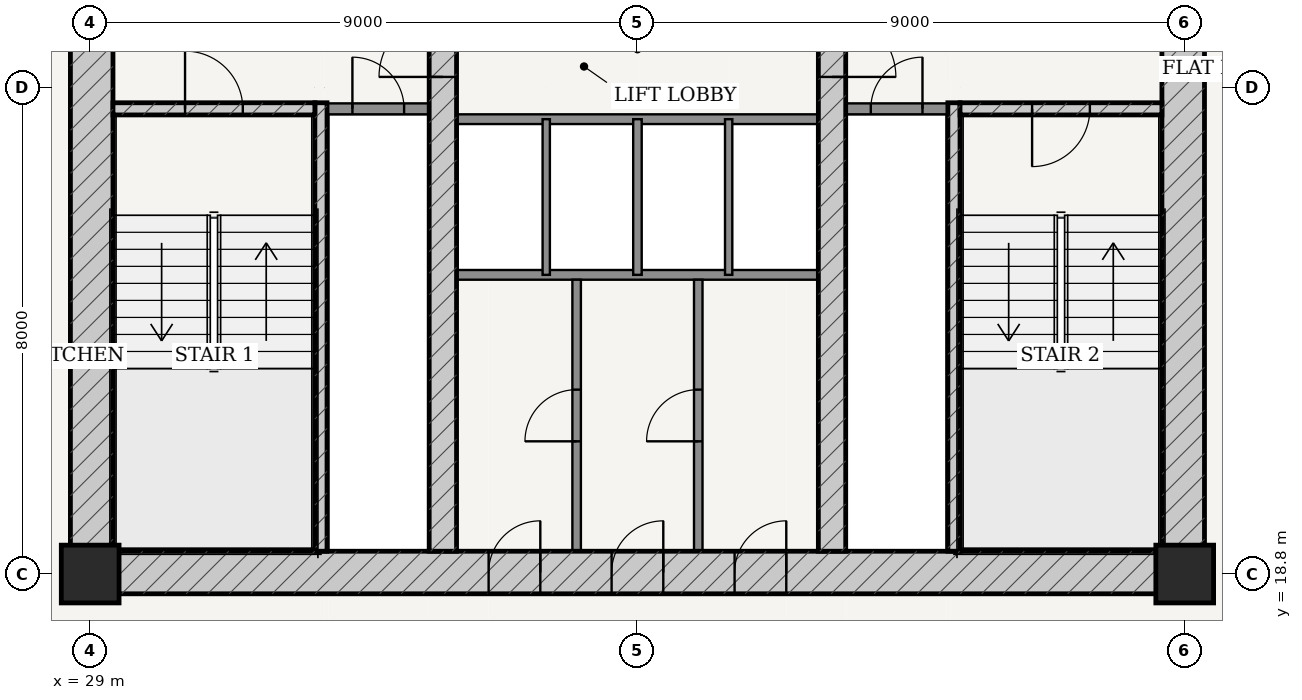
"""IFC4 building model, lengths in metres.
Left out: names, types, materials, properties, quantities, classifications, styles, units other than length and angle.
Written with IfcOpenShell. Run it as: python <this file> out.ifc"""

import sys

from ifc_helpers import new_model, si_unit, direction, frame, frame_2d, origin, origin_2d, place, context, subcontext, project, spatial, rectangle, extrude, source, transform, mapped, element, fill, save


model = new_model("IFC4")
c1 = context("Model", 3, precision=1e-05, world=origin(), true_north=direction((-0.2419218956, 0.970295726276)))
c2 = subcontext(c1, "Body", "Model", "MODEL_VIEW")
j1 = project(units=[si_unit("LENGTHUNIT", "METRE"), si_unit("PLANEANGLEUNIT", "RADIAN")], contexts=[c1])
p1 = place(None, origin())
s1 = spatial("IfcSite", under=j1, at=p1, CompositionType="ELEMENT")
p2 = place(p1, origin())
s2 = spatial("IfcBuilding", under=s1, at=p2, CompositionType="ELEMENT")
p3 = place(p2, frame((0.0, 0.0, 101.4)))
s3 = spatial("IfcBuildingStorey", under=s2, at=p3, CompositionType="ELEMENT", Elevation=101.4)
for number, where, z_axis, x_axis in (
    (1, (29.0, 18.8, 0.0), (0.0, 0.0, 1.0), (1.0, 0.0, 0.0)),
    (2, (47.0, 18.8, 0.0), (0.0, 0.0, 1.0), (1.0, 0.0, 0.0)),
):
    element("IfcColumn", number, at=place(p3, frame(where, z_axis=z_axis, x_axis=x_axis)), inside=s3, PredefinedType="COLUMN", context=c2, shape_type="SweptSolid", body=[
        extrude(rectangle(XDim=0.95, YDim=0.95, at=origin_2d()), origin(), (0.0, 0.0, 1.0), 3.6),
    ])
p4 = place(p3, frame((28.675, 18.825, 0.0), z_axis=(0.0, 0.0, 1.0), x_axis=(1.0, 0.0, 0.0)))
e3 = element("IfcWall", 3, at=p4, inside=s3, PredefinedType="SHEAR", context=c2, shape_type="SweptSolid", body=[
    extrude(rectangle(XDim=18.65, YDim=0.7, at=frame_2d((9.325, 0.0))), origin(), (0.0, 0.0, 1.0), 3.325),
])
p5 = place(p4, frame((6.877, 0.0, 0.0)))
e4 = element("IfcOpeningElement", 4, at=p5, cuts=e3, PredefinedType="OPENING", context=c2, shape_type="SweptSolid", body=[
    extrude(rectangle(XDim=0.85, YDim=2.1, at=frame_2d((0.425, 1.05))), frame((0.0, 0.36, 0.0), z_axis=(0.0, -1.0, 0.0), x_axis=(1.0, 0.0, 0.0)), (0.0, 0.0, 1.0), 0.72),
])
p6 = place(p4, frame((8.9, 0.0, 0.0)))
e5 = element("IfcOpeningElement", 5, at=p6, cuts=e3, PredefinedType="OPENING", context=c2, shape_type="SweptSolid", body=[
    extrude(rectangle(XDim=0.85, YDim=2.1, at=frame_2d((0.425, 1.05))), frame((0.0, 0.36, 0.0), z_axis=(0.0, -1.0, 0.0), x_axis=(1.0, 0.0, 0.0)), (0.0, 0.0, 1.0), 0.72),
])
p7 = place(p4, frame((10.923, 0.0, 0.0)))
e6 = element("IfcOpeningElement", 6, at=p7, cuts=e3, PredefinedType="OPENING", context=c2, shape_type="SweptSolid", body=[
    extrude(rectangle(XDim=0.85, YDim=2.1, at=frame_2d((0.425, 1.05))), frame((0.0, 0.36, 0.0), z_axis=(0.0, -1.0, 0.0), x_axis=(1.0, 0.0, 0.0)), (0.0, 0.0, 1.0), 0.72),
])
p8 = place(p3, frame((29.025, 19.175, 0.0), z_axis=(0.0, 0.0, 1.0), x_axis=(0.0, 1.0, 0.0)))
e7 = element("IfcWall", 7, at=p8, inside=s3, PredefinedType="SHEAR", context=c2, shape_type="SweptSolid", body=[
    extrude(rectangle(XDim=15.25, YDim=0.7, at=frame_2d((7.625, 0.0))), origin(), (0.0, 0.0, 1.0), 3.325),
])
p9 = place(p8, frame((9.875, 0.0, 0.0)))
e8 = element("IfcOpeningElement", 8, at=p9, cuts=e7, PredefinedType="OPENING", context=c2, shape_type="SweptSolid", body=[
    extrude(rectangle(XDim=1.5, YDim=2.2, at=frame_2d((0.75, 1.1))), frame((0.0, 0.36, 0.0), z_axis=(0.0, -1.0, 0.0), x_axis=(1.0, 0.0, 0.0)), (0.0, 0.0, 1.0), 0.72),
])
p10 = place(p3, frame((46.975, 19.175, 0.0), z_axis=(0.0, 0.0, 1.0), x_axis=(0.0, 1.0, 0.0)))
e9 = element("IfcWall", 9, at=p10, inside=s3, PredefinedType="SHEAR", context=c2, shape_type="SweptSolid", body=[
    extrude(rectangle(XDim=15.25, YDim=0.7, at=frame_2d((7.625, 0.0))), origin(), (0.0, 0.0, 1.0), 3.325),
])
p11 = place(p10, frame((9.875, 0.0, 0.0)))
e10 = element("IfcOpeningElement", 10, at=p11, cuts=e9, PredefinedType="OPENING", context=c2, shape_type="SweptSolid", body=[
    extrude(rectangle(XDim=1.5, YDim=2.2, at=frame_2d((0.75, 1.1))), frame((0.0, 0.36, 0.0), z_axis=(0.0, -1.0, 0.0), x_axis=(1.0, 0.0, 0.0)), (0.0, 0.0, 1.0), 0.72),
])
p12 = place(p3, frame((32.795, 19.175, 0.0), z_axis=(0.0, 0.0, 1.0), x_axis=(0.0, 1.0, 0.0)))
e11 = element("IfcWall", 11, at=p12, inside=s3, PredefinedType="SOLIDWALL", context=c2, shape_type="SweptSolid", body=[
    extrude(rectangle(XDim=7.375, YDim=0.2, at=frame_2d((3.688, 0.0))), origin(), (0.0, 0.0, 1.0), 3.325),
])
p13 = place(p3, frame((29.375, 26.45, 0.0), z_axis=(0.0, 0.0, 1.0), x_axis=(1.0, 0.0, 0.0)))
e12 = element("IfcWall", 12, at=p13, inside=s3, PredefinedType="SOLIDWALL", context=c2, shape_type="SweptSolid", body=[
    extrude(rectangle(XDim=3.32, YDim=0.2, at=frame_2d((1.66, 0.0))), origin(), (0.0, 0.0, 1.0), 3.325),
])
p14 = place(p13, frame((1.185, 0.0, 0.0)))
e13 = element("IfcOpeningElement", 13, at=p14, cuts=e12, PredefinedType="OPENING", context=c2, shape_type="SweptSolid", body=[
    extrude(rectangle(XDim=0.95, YDim=2.15, at=frame_2d((0.475, 1.075))), frame((0.0, 0.11, 0.0), z_axis=(0.0, -1.0, 0.0), x_axis=(1.0, 0.0, 0.0)), (0.0, 0.0, 1.0), 0.22),
])
p15 = place(p3, frame((43.205, 19.175, 0.0), z_axis=(0.0, 0.0, 1.0), x_axis=(0.0, 1.0, 0.0)))
e14 = element("IfcWall", 14, at=p15, inside=s3, PredefinedType="SOLIDWALL", context=c2, shape_type="SweptSolid", body=[
    extrude(rectangle(XDim=7.375, YDim=0.2, at=frame_2d((3.688, 0.0))), origin(), (0.0, 0.0, 1.0), 3.325),
])
p16 = place(p3, frame((43.305, 26.45, 0.0), z_axis=(0.0, 0.0, 1.0), x_axis=(1.0, 0.0, 0.0)))
e15 = element("IfcWall", 15, at=p16, inside=s3, PredefinedType="SOLIDWALL", context=c2, shape_type="SweptSolid", body=[
    extrude(rectangle(XDim=3.32, YDim=0.2, at=frame_2d((1.66, 0.0))), origin(), (0.0, 0.0, 1.0), 3.325),
])
p17 = place(p16, frame((1.185, 0.0, 0.0)))
e16 = element("IfcOpeningElement", 16, at=p17, cuts=e15, PredefinedType="OPENING", context=c2, shape_type="SweptSolid", body=[
    extrude(rectangle(XDim=0.95, YDim=2.15, at=frame_2d((0.475, 1.075))), frame((0.0, 0.11, 0.0), z_axis=(0.0, -1.0, 0.0), x_axis=(1.0, 0.0, 0.0)), (0.0, 0.0, 1.0), 0.22),
])
p18 = place(p3, frame((34.8, 19.175, 0.0), z_axis=(0.0, 0.0, 1.0), x_axis=(0.0, 1.0, 0.0)))
e17 = element("IfcWall", 17, at=p18, inside=s3, PredefinedType="SHEAR", context=c2, shape_type="SweptSolid", body=[
    extrude(rectangle(XDim=15.25, YDim=0.45, at=frame_2d((7.625, 0.0))), origin(), (0.0, 0.0, 1.0), 3.325),
])
p19 = place(p18, frame((7.8, 0.0, 0.0)))
e18 = element("IfcOpeningElement", 18, at=p19, cuts=e17, PredefinedType="OPENING", context=c2, shape_type="SweptSolid", body=[
    extrude(rectangle(XDim=1.05, YDim=2.15, at=frame_2d((0.525, 1.075))), frame((0.0, 0.235, 0.0), z_axis=(0.0, -1.0, 0.0), x_axis=(1.0, 0.0, 0.0)), (0.0, 0.0, 1.0), 0.47),
])
p20 = place(p3, frame((41.2, 19.175, 0.0), z_axis=(0.0, 0.0, 1.0), x_axis=(0.0, 1.0, 0.0)))
e19 = element("IfcWall", 19, at=p20, inside=s3, PredefinedType="SHEAR", context=c2, shape_type="SweptSolid", body=[
    extrude(rectangle(XDim=15.25, YDim=0.45, at=frame_2d((7.625, 0.0))), origin(), (0.0, 0.0, 1.0), 3.325),
])
p21 = place(p20, frame((7.8, 0.0, 0.0)))
e20 = element("IfcOpeningElement", 20, at=p21, cuts=e19, PredefinedType="OPENING", context=c2, shape_type="SweptSolid", body=[
    extrude(rectangle(XDim=1.05, YDim=2.15, at=frame_2d((0.525, 1.075))), frame((0.0, 0.235, 0.0), z_axis=(0.0, -1.0, 0.0), x_axis=(1.0, 0.0, 0.0)), (0.0, 0.0, 1.0), 0.47),
])
p22 = place(p3, frame((32.9, 26.45, 0.0), z_axis=(0.0, 0.0, 1.0), x_axis=(1.0, 0.0, 0.0)))
e21 = element("IfcWall", 21, at=p22, inside=s3, PredefinedType="PARTITIONING", context=c2, shape_type="SweptSolid", body=[
    extrude(rectangle(XDim=1.675, YDim=0.18, at=frame_2d((0.837, 0.0))), origin(), (0.0, 0.0, 1.0), 3.325),
])
p23 = place(p22, frame((0.413, 0.0, 0.0)))
e22 = element("IfcOpeningElement", 22, at=p23, cuts=e21, PredefinedType="OPENING", context=c2, shape_type="SweptSolid", body=[
    extrude(rectangle(XDim=0.85, YDim=2.1, at=frame_2d((0.425, 1.05))), frame((0.0, 0.1, 0.0), z_axis=(0.0, -1.0, 0.0), x_axis=(1.0, 0.0, 0.0)), (0.0, 0.0, 1.0), 0.2),
])
p24 = place(p3, frame((41.425, 26.45, 0.0), z_axis=(0.0, 0.0, 1.0), x_axis=(1.0, 0.0, 0.0)))
e23 = element("IfcWall", 23, at=p24, inside=s3, PredefinedType="PARTITIONING", context=c2, shape_type="SweptSolid", body=[
    extrude(rectangle(XDim=1.675, YDim=0.18, at=frame_2d((0.837, 0.0))), origin(), (0.0, 0.0, 1.0), 3.325),
])
p25 = place(p24, frame((0.413, 0.0, 0.0)))
e24 = element("IfcOpeningElement", 24, at=p25, cuts=e23, PredefinedType="OPENING", context=c2, shape_type="SweptSolid", body=[
    extrude(rectangle(XDim=0.85, YDim=2.1, at=frame_2d((0.425, 1.05))), frame((0.0, 0.1, 0.0), z_axis=(0.0, -1.0, 0.0), x_axis=(1.0, 0.0, 0.0)), (0.0, 0.0, 1.0), 0.2),
])
for number, where, z_axis, x_axis in (
    (25, (35.025, 26.28, 0.0), (0.0, 0.0, 1.0), (1.0, 0.0, 0.0)),
    (26, (35.025, 23.72, 0.0), (0.0, 0.0, 1.0), (1.0, 0.0, 0.0)),
):
    element("IfcWall", number, at=place(p3, frame(where, z_axis=z_axis, x_axis=x_axis)), inside=s3, PredefinedType="PARTITIONING", context=c2, shape_type="SweptSolid", body=[
        extrude(rectangle(XDim=5.95, YDim=0.16, at=frame_2d((2.975, 0.0))), origin(), (0.0, 0.0, 1.0), 3.325),
    ])
p26 = place(p3, frame((36.5, 23.72, 0.0), z_axis=(0.0, 0.0, 1.0), x_axis=(0.0, 1.0, 0.0)))
e27 = element("IfcWall", 27, at=p26, inside=s3, PredefinedType="PARTITIONING", context=c2, shape_type="SweptSolid", body=[
    extrude(rectangle(XDim=2.56, YDim=0.12, at=frame_2d((1.28, 0.0))), origin(), (0.0, 0.0, 1.0), 3.325),
])
p27 = place(p3, frame((38.0, 23.72, 0.0), z_axis=(0.0, 0.0, 1.0), x_axis=(0.0, 1.0, 0.0)))
e28 = element("IfcWall", 28, at=p27, inside=s3, PredefinedType="PARTITIONING", context=c2, shape_type="SweptSolid", body=[
    extrude(rectangle(XDim=2.56, YDim=0.14, at=frame_2d((1.28, 0.0))), origin(), (0.0, 0.0, 1.0), 3.325),
])
p28 = place(p3, frame((39.5, 23.72, 0.0), z_axis=(0.0, 0.0, 1.0), x_axis=(0.0, 1.0, 0.0)))
e29 = element("IfcWall", 29, at=p28, inside=s3, PredefinedType="PARTITIONING", context=c2, shape_type="SweptSolid", body=[
    extrude(rectangle(XDim=2.56, YDim=0.12, at=frame_2d((1.28, 0.0))), origin(), (0.0, 0.0, 1.0), 3.325),
])
p29 = place(p3, frame((37.0, 19.175, 0.0), z_axis=(0.0, 0.0, 1.0), x_axis=(0.0, 1.0, 0.0)))
e30 = element("IfcWall", 30, at=p29, inside=s3, PredefinedType="PARTITIONING", context=c2, shape_type="SweptSolid", body=[
    extrude(rectangle(XDim=4.465, YDim=0.14, at=frame_2d((2.232, 0.0))), origin(), (0.0, 0.0, 1.0), 3.325),
])
p30 = place(p29, frame((1.808, 0.0, 0.0)))
e31 = element("IfcOpeningElement", 31, at=p30, cuts=e30, PredefinedType="OPENING", context=c2, shape_type="SweptSolid", body=[
    extrude(rectangle(XDim=0.85, YDim=2.1, at=frame_2d((0.425, 1.05))), frame((0.0, 0.08, 0.0), z_axis=(0.0, -1.0, 0.0), x_axis=(1.0, 0.0, 0.0)), (0.0, 0.0, 1.0), 0.16),
])
p31 = place(p3, frame((39.0, 19.175, 0.0), z_axis=(0.0, 0.0, 1.0), x_axis=(0.0, 1.0, 0.0)))
e32 = element("IfcWall", 32, at=p31, inside=s3, PredefinedType="PARTITIONING", context=c2, shape_type="SweptSolid", body=[
    extrude(rectangle(XDim=4.465, YDim=0.14, at=frame_2d((2.232, 0.0))), origin(), (0.0, 0.0, 1.0), 3.325),
])
p32 = place(p31, frame((1.808, 0.0, 0.0)))
e33 = element("IfcOpeningElement", 33, at=p32, cuts=e32, PredefinedType="OPENING", context=c2, shape_type="SweptSolid", body=[
    extrude(rectangle(XDim=0.85, YDim=2.1, at=frame_2d((0.425, 1.05))), frame((0.0, 0.08, 0.0), z_axis=(0.0, -1.0, 0.0), x_axis=(1.0, 0.0, 0.0)), (0.0, 0.0, 1.0), 0.16),
])
m1 = source(origin(), c2, "Body", "SweptSolid", [
    extrude(rectangle(XDim=1.05, YDim=2.15, at=frame_2d((0.525, 1.075))), frame((0.0, 0.025, 0.0), z_axis=(0.0, -1.0, 0.0), x_axis=(1.0, 0.0, 0.0)), (0.0, 0.0, 1.0), 0.05),
])
p33 = place(p19, origin())
e34 = element("IfcDoor", 34, at=p33, inside=s3, OperationType="SINGLE_SWING_LEFT", PredefinedType="DOOR", context=c2, shape_type="MappedRepresentation", body=[
    mapped(m1, transform((0.0, 0.0, 0.0), scale=1.0)),
])
fill(e18, e34)
p34 = place(p21, frame((1.05, 0.0, 0.0), z_axis=(0.0, 0.0, 1.0), x_axis=(-1.0, 0.0, 0.0)))
e35 = element("IfcDoor", 35, at=p34, inside=s3, OperationType="SINGLE_SWING_RIGHT", PredefinedType="DOOR", context=c2, shape_type="MappedRepresentation", body=[
    mapped(m1, transform((0.0, 0.0, 0.0), scale=1.0)),
])
fill(e20, e35)
m2 = source(origin(), c2, "Body", "SweptSolid", [
    extrude(rectangle(XDim=0.95, YDim=2.15, at=frame_2d((0.475, 1.075))), frame((0.0, 0.025, 0.0), z_axis=(0.0, -1.0, 0.0), x_axis=(1.0, 0.0, 0.0)), (0.0, 0.0, 1.0), 0.05),
])
p35 = place(p14, origin())
e36 = element("IfcDoor", 36, at=p35, inside=s3, OperationType="SINGLE_SWING_LEFT", PredefinedType="DOOR", context=c2, shape_type="MappedRepresentation", body=[
    mapped(m2, transform((0.0, 0.0, 0.0), scale=1.0)),
])
fill(e13, e36)
p36 = place(p17, frame((0.95, 0.0, 0.0), z_axis=(0.0, 0.0, 1.0), x_axis=(-1.0, 0.0, 0.0)))
e37 = element("IfcDoor", 37, at=p36, inside=s3, OperationType="SINGLE_SWING_RIGHT", PredefinedType="DOOR", context=c2, shape_type="MappedRepresentation", body=[
    mapped(m2, transform((0.0, 0.0, 0.0), scale=1.0)),
])
fill(e16, e37)
m3 = source(origin(), c2, "Body", "SweptSolid", [
    extrude(rectangle(XDim=0.85, YDim=2.1, at=frame_2d((0.425, 1.05))), frame((0.0, 0.025, 0.0), z_axis=(0.0, -1.0, 0.0), x_axis=(1.0, 0.0, 0.0)), (0.0, 0.0, 1.0), 0.05),
])
p37 = place(p23, origin())
e38 = element("IfcDoor", 38, at=p37, inside=s3, OperationType="SINGLE_SWING_LEFT", PredefinedType="DOOR", context=c2, shape_type="MappedRepresentation", body=[
    mapped(m3, transform((0.0, 0.0, 0.0), scale=1.0)),
])
fill(e22, e38)
p38 = place(p25, origin())
e39 = element("IfcDoor", 39, at=p38, inside=s3, OperationType="SINGLE_SWING_RIGHT", PredefinedType="DOOR", context=c2, shape_type="MappedRepresentation", body=[
    mapped(m3, transform((0.0, 0.0, 0.0), scale=1.0)),
])
fill(e24, e39)
p39 = place(p5, origin())
e40 = element("IfcDoor", 40, at=p39, inside=s3, OperationType="SINGLE_SWING_RIGHT", PredefinedType="DOOR", context=c2, shape_type="MappedRepresentation", body=[
    mapped(m3, transform((0.0, 0.0, 0.0), scale=1.0)),
])
fill(e4, e40)
p40 = place(p6, origin())
e41 = element("IfcDoor", 41, at=p40, inside=s3, OperationType="SINGLE_SWING_RIGHT", PredefinedType="DOOR", context=c2, shape_type="MappedRepresentation", body=[
    mapped(m3, transform((0.0, 0.0, 0.0), scale=1.0)),
])
fill(e5, e41)
p41 = place(p7, origin())
e42 = element("IfcDoor", 42, at=p41, inside=s3, OperationType="SINGLE_SWING_RIGHT", PredefinedType="DOOR", context=c2, shape_type="MappedRepresentation", body=[
    mapped(m3, transform((0.0, 0.0, 0.0), scale=1.0)),
])
fill(e6, e42)
p42 = place(p30, origin())
e43 = element("IfcDoor", 43, at=p42, inside=s3, OperationType="SINGLE_SWING_LEFT", PredefinedType="DOOR", context=c2, shape_type="MappedRepresentation", body=[
    mapped(m3, transform((0.0, 0.0, 0.0), scale=1.0)),
])
fill(e31, e43)
p43 = place(p32, origin())
e44 = element("IfcDoor", 44, at=p43, inside=s3, OperationType="SINGLE_SWING_LEFT", PredefinedType="DOOR", context=c2, shape_type="MappedRepresentation", body=[
    mapped(m3, transform((0.0, 0.0, 0.0), scale=1.0)),
])
fill(e33, e44)
save(model, sys.argv[1])
